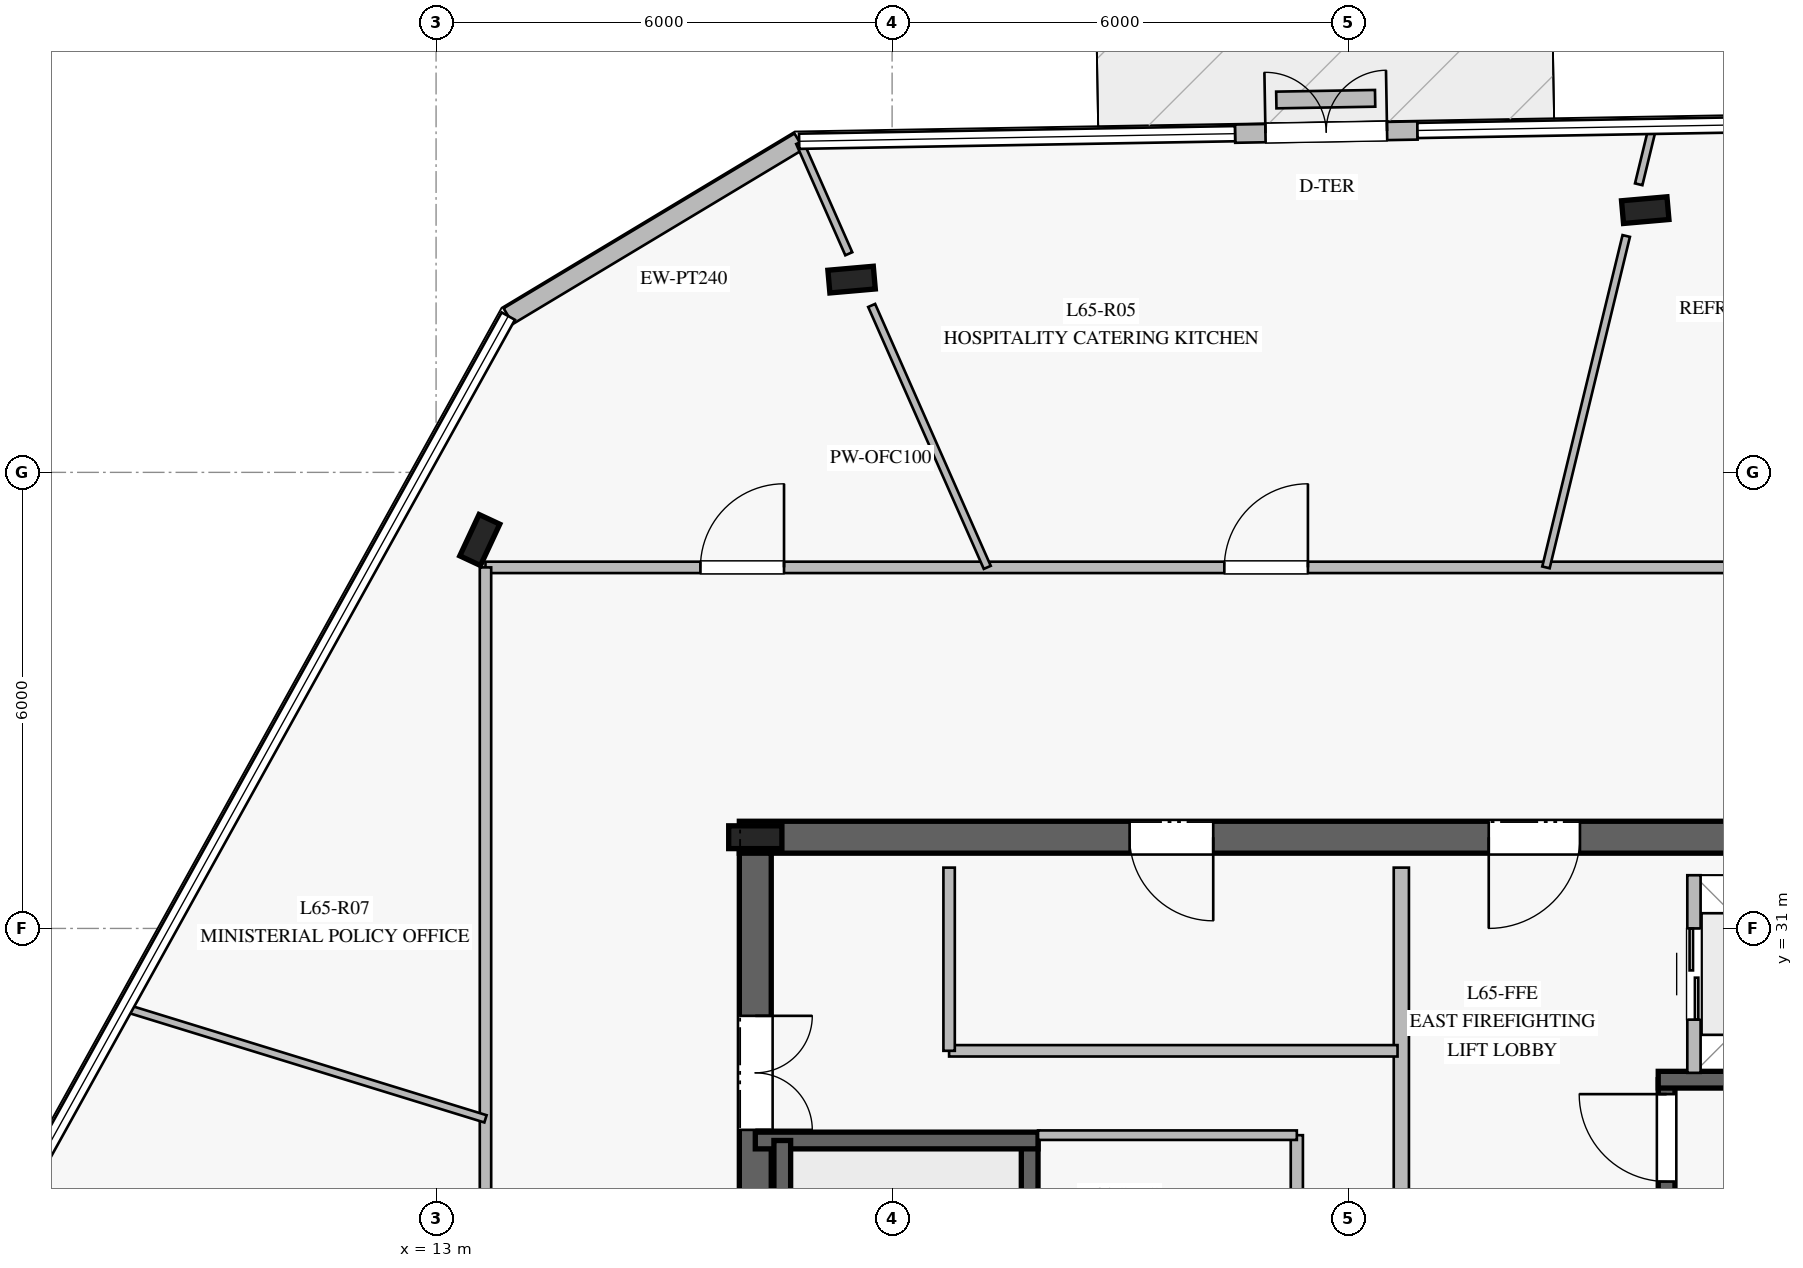
"""IFC4 building model, lengths in metres.
Left out: names, types, materials, properties, quantities, classifications, styles, units other than length and angle.
Written with IfcOpenShell. Run it as: python <this file> out.ifc"""

import sys

from ifc_helpers import new_model, si_unit, direction, frame, frame_2d, origin, origin_2d, place, context, subcontext, project, spatial, rectangle, i_section, extrude, element, fill, save


model = new_model("IFC4")
c1 = context("Model", 3, precision=1e-05, world=origin(), true_north=direction((0.0, 1.0)))
c2 = subcontext(c1, "Body", "Model", "MODEL_VIEW")
j1 = project(units=[si_unit("LENGTHUNIT", "METRE"), si_unit("PLANEANGLEUNIT", "RADIAN")], contexts=[c1])
p1 = place(None, origin())
s1 = spatial("IfcSite", under=j1, at=p1, CompositionType="ELEMENT")
p2 = place(p1, origin())
s2 = spatial("IfcBuilding", under=s1, at=p2, CompositionType="ELEMENT")
p3 = place(p2, frame((0.0, 0.0, 270.2)))
s3 = spatial("IfcBuildingStorey", under=s2, at=p3, CompositionType="ELEMENT", Elevation=270.2)
p4 = place(p3, frame((33.01, 32.2, 0.0), z_axis=(0.0, 0.0, 1.0), x_axis=(-1.0, 0.0, 0.0)))
e1 = element("IfcWall", 1, at=p4, inside=s3, PredefinedType="SHEAR", context=c2, shape_type="SweptSolid", body=[
    extrude(rectangle(XDim=16.02, YDim=0.42, at=frame_2d((8.01, 0.0))), origin(), (0.0, 0.0, 1.0), 3.78),
])
p5 = place(p4, frame((4.96, 0.0, 0.0)))
e2 = element("IfcOpeningElement", 2, at=p5, cuts=e1, PredefinedType="OPENING", context=c2, shape_type="SweptSolid", body=[
    extrude(rectangle(XDim=1.2, YDim=2.25, at=frame_2d((0.6, 1.125))), frame((0.0, 0.22, 0.0), z_axis=(0.0, -1.0, 0.0), x_axis=(1.0, 0.0, 0.0)), (0.0, 0.0, 1.0), 0.44),
])
p6 = place(p4, frame((9.785, 0.0, 0.0)))
e3 = element("IfcOpeningElement", 3, at=p6, cuts=e1, PredefinedType="OPENING", context=c2, shape_type="SweptSolid", body=[
    extrude(rectangle(XDim=1.1, YDim=2.2, at=frame_2d((0.55, 1.1))), frame((0.0, 0.22, 0.0), z_axis=(0.0, -1.0, 0.0), x_axis=(1.0, 0.0, 0.0)), (0.0, 0.0, 1.0), 0.44),
])
p7 = place(p3, frame((17.2, 31.99, 0.0), z_axis=(0.0, 0.0, 1.0), x_axis=(0.0, -1.0, 0.0)))
e4 = element("IfcWall", 4, at=p7, inside=s3, PredefinedType="SHEAR", context=c2, shape_type="SweptSolid", body=[
    extrude(rectangle(XDim=13.98, YDim=0.42, at=frame_2d((6.99, 0.0))), origin(), (0.0, 0.0, 1.0), 3.78),
])
p8 = place(p7, frame((2.14, 0.0, 0.0)))
e5 = element("IfcOpeningElement", 5, at=p8, cuts=e4, PredefinedType="OPENING", context=c2, shape_type="SweptSolid", body=[
    extrude(rectangle(XDim=1.5, YDim=2.2, at=frame_2d((0.75, 1.1))), frame((0.0, 0.22, 0.0), z_axis=(0.0, -1.0, 0.0), x_axis=(1.0, 0.0, 0.0)), (0.0, 0.0, 1.0), 0.44),
])
p9 = place(p3, frame((17.2, 32.2, 0.0), z_axis=(0.0, 0.0, 1.0), x_axis=(1.0, 0.0, 0.0)))
e6 = element("IfcColumn", 6, at=p9, inside=s3, PredefinedType="COLUMN", context=c2, shape_type="SweptSolid", body=[
    extrude(i_section(OverallWidth=0.3, OverallDepth=0.7, WebThickness=0.017, FlangeThickness=0.032, at=origin_2d()), origin(), (0.0, 0.0, 1.0), 4.0),
])
p10 = place(p3, frame((20.81, 20.99, 0.0), z_axis=(0.0, 0.0, 1.0), x_axis=(0.0, 1.0, 0.0)))
e7 = element("IfcWall", 7, at=p10, inside=s3, PredefinedType="SOLIDWALL", context=c2, shape_type="SweptSolid", body=[
    extrude(rectangle(XDim=7.22, YDim=0.22, at=frame_2d((3.61, 0.0))), origin(), (0.0, 0.0, 1.0), 3.78),
])
p11 = place(p10, frame((0.18, 0.0, 0.0)))
e8 = element("IfcOpeningElement", 8, at=p11, cuts=e7, PredefinedType="OPENING", context=c2, shape_type="SweptSolid", body=[
    extrude(rectangle(XDim=1.15, YDim=2.2, at=frame_2d((0.575, 1.1))), frame((0.0, 0.12, 0.0), z_axis=(0.0, -1.0, 0.0), x_axis=(1.0, 0.0, 0.0)), (0.0, 0.0, 1.0), 0.24),
])
p12 = place(p3, frame((17.2, 28.21, 0.0), z_axis=(0.0, 0.0, 1.0), x_axis=(1.0, 0.0, 0.0)))
e9 = element("IfcWall", 9, at=p12, inside=s3, PredefinedType="SOLIDWALL", context=c2, shape_type="SweptSolid", body=[
    extrude(rectangle(XDim=3.72, YDim=0.22, at=frame_2d((1.86, 0.0))), origin(), (0.0, 0.0, 1.0), 3.78),
])
p13 = place(p3, frame((17.555, 28.21, 0.0), z_axis=(0.0, 0.0, 1.0), x_axis=(0.0, -1.0, 0.0)))
e10 = element("IfcWall", 10, at=p13, inside=s3, PredefinedType="SOLIDWALL", context=c2, shape_type="SweptSolid", body=[
    extrude(rectangle(XDim=7.22, YDim=0.22, at=frame_2d((3.61, 0.0))), origin(), (0.0, 0.0, 1.0), 3.78),
])
p14 = place(p3, frame((29.19, 21.79, 0.0), z_axis=(0.0, 0.0, 1.0), x_axis=(0.0, 1.0, 0.0)))
e11 = element("IfcWall", 11, at=p14, inside=s3, PredefinedType="SOLIDWALL", context=c2, shape_type="SweptSolid", body=[
    extrude(rectangle(XDim=7.22, YDim=0.22, at=frame_2d((3.61, 0.0))), origin(), (0.0, 0.0, 1.0), 3.78),
])
p15 = place(p14, frame((5.88, 0.0, 0.0)))
e12 = element("IfcOpeningElement", 12, at=p15, cuts=e11, PredefinedType="OPENING", context=c2, shape_type="SweptSolid", body=[
    extrude(rectangle(XDim=1.15, YDim=2.2, at=frame_2d((0.575, 1.1))), frame((0.0, 0.12, 0.0), z_axis=(0.0, -1.0, 0.0), x_axis=(1.0, 0.0, 0.0)), (0.0, 0.0, 1.0), 0.24),
])
p16 = place(p3, frame((29.08, 29.01, 0.0), z_axis=(0.0, 0.0, 1.0), x_axis=(1.0, 0.0, 0.0)))
e13 = element("IfcWall", 13, at=p16, inside=s3, PredefinedType="SOLIDWALL", context=c2, shape_type="SweptSolid", body=[
    extrude(rectangle(XDim=3.72, YDim=0.22, at=frame_2d((1.86, 0.0))), origin(), (0.0, 0.0, 1.0), 3.78),
])
for number, where, z_axis, x_axis in (
    (14, (28.909, 40.45, 0.0), (0.0, 0.0, 1.0), (0.996, 0.087, 0.0)),
    (15, (18.467, 39.536, 0.0), (0.0, 0.0, 1.0), (0.996, 0.087, 0.0)),
    (16, (13.575, 36.11, 0.0), (0.0, 0.0, 1.0), (0.423, 0.906, 0.0)),
):
    element("IfcColumn", number, at=place(p3, frame(where, z_axis=z_axis, x_axis=x_axis)), inside=s3, PredefinedType="COLUMN", context=c2, shape_type="SweptSolid", body=[
        extrude(i_section(OverallWidth=0.3, OverallDepth=0.6, WebThickness=0.015, FlangeThickness=0.03, at=origin_2d()), origin(), (0.0, 0.0, 1.0), 4.0),
    ])
p17 = place(p3, frame((25.912, 41.498, 0.0), z_axis=(0.0, 0.0, 1.0), x_axis=(-0.999846985771, -0.017492999853, 0.0)))
e17 = element("IfcWall", 17, at=p17, inside=s3, PredefinedType="STANDARD", context=c2, shape_type="SweptSolid", body=[
    extrude(rectangle(XDim=2.401, YDim=0.24, at=frame_2d((1.2, 0.0))), origin(), (0.0, 0.0, 1.0), 3.78),
])
p18 = place(p17, frame((0.4, 0.0, 0.0)))
e18 = element("IfcOpeningElement", 18, at=p18, cuts=e17, PredefinedType="OPENING", context=c2, shape_type="SweptSolid", body=[
    extrude(rectangle(XDim=1.6, YDim=2.25, at=frame_2d((0.8, 1.125))), frame((0.0, 0.13, 0.0), z_axis=(0.0, -1.0, 0.0), x_axis=(1.0, 0.0, 0.0)), (0.0, 0.0, 1.0), 0.26),
])
p19 = place(p3, frame((17.777, 41.356, 0.0), z_axis=(0.0, 0.0, 1.0), x_axis=(-0.857121218243, -0.515114761231, 0.0)))
e19 = element("IfcWall", 19, at=p19, inside=s3, PredefinedType="STANDARD", context=c2, shape_type="SweptSolid", body=[
    extrude(rectangle(XDim=4.465, YDim=0.24, at=frame_2d((2.232, 0.0))), origin(), (0.0, 0.0, 1.0), 3.78),
])
p20 = place(p3, frame((25.355, 41.921, 0.0), z_axis=(0.0, 0.0, 1.0), x_axis=(-0.999857201789, -0.01689899496, 0.0)))
e20 = element("IfcWall", 20, at=p20, inside=s3, PredefinedType="USERDEFINED", context=c2, shape_type="SweptSolid", body=[
    extrude(rectangle(XDim=1.3, YDim=0.22, at=frame_2d((0.65, 0.0))), origin(), (0.0, 0.0, 1.0), 0.4),
])
p21 = place(p3, frame((25.7, 26.65, 0.0), z_axis=(0.0, 0.0, 1.0), x_axis=(0.0, 1.0, 0.0)))
e21 = element("IfcWall", 21, at=p21, inside=s3, PredefinedType="PARTITIONING", context=c2, shape_type="SweptSolid", body=[
    extrude(rectangle(XDim=5.15, YDim=0.2, at=frame_2d((2.575, 0.0))), origin(), (0.0, 0.0, 1.0), 3.78),
])
p22 = place(p3, frame((24.325, 23.35, 0.0), z_axis=(0.0, 0.0, 1.0), x_axis=(0.0, 1.0, 0.0)))
e22 = element("IfcWall", 22, at=p22, inside=s3, PredefinedType="PLUMBINGWALL", context=c2, shape_type="SweptSolid", body=[
    extrude(rectangle(XDim=4.93, YDim=0.16, at=frame_2d((2.465, 0.0))), origin(), (0.0, 0.0, 1.0), 3.78),
])
p23 = place(p22, frame((0.8, 0.0, 0.0)))
e23 = element("IfcOpeningElement", 23, at=p23, cuts=e22, PredefinedType="OPENING", context=c2, shape_type="SweptSolid", body=[
    extrude(rectangle(XDim=0.95, YDim=2.1, at=frame_2d((0.475, 1.05))), frame((0.0, 0.09, 0.0), z_axis=(0.0, -1.0, 0.0), x_axis=(1.0, 0.0, 0.0)), (0.0, 0.0, 1.0), 0.18),
])
p24 = place(p22, frame((3.26, 0.0, 0.0)))
e24 = element("IfcOpeningElement", 24, at=p24, cuts=e22, PredefinedType="OPENING", context=c2, shape_type="SweptSolid", body=[
    extrude(rectangle(XDim=0.9, YDim=2.1, at=frame_2d((0.45, 1.05))), frame((0.0, 0.09, 0.0), z_axis=(0.0, -1.0, 0.0), x_axis=(1.0, 0.0, 0.0)), (0.0, 0.0, 1.0), 0.18),
])
p25 = place(p3, frame((20.92, 28.28, 0.0), z_axis=(0.0, 0.0, 1.0), x_axis=(1.0, 0.0, 0.0)))
e25 = element("IfcWall", 25, at=p25, inside=s3, PredefinedType="PARTITIONING", context=c2, shape_type="SweptSolid", body=[
    extrude(rectangle(XDim=3.405, YDim=0.125, at=frame_2d((1.703, 0.0))), origin(), (0.0, 0.0, 1.0), 3.78),
])
p26 = place(p3, frame((19.75, 29.39, 0.0), z_axis=(0.0, 0.0, 1.0), x_axis=(1.0, 0.0, 0.0)))
e26 = element("IfcWall", 26, at=p26, inside=s3, PredefinedType="PARTITIONING", context=c2, shape_type="SweptSolid", body=[
    extrude(rectangle(XDim=5.9, YDim=0.15, at=frame_2d((2.95, 0.0))), origin(), (0.0, 0.0, 1.0), 3.78),
])
p27 = place(p3, frame((19.75, 29.39, 0.0), z_axis=(0.0, 0.0, 1.0), x_axis=(0.0, 1.0, 0.0)))
e27 = element("IfcWall", 27, at=p27, inside=s3, PredefinedType="PARTITIONING", context=c2, shape_type="SweptSolid", body=[
    extrude(rectangle(XDim=2.41, YDim=0.15, at=frame_2d((1.205, 0.0))), origin(), (0.0, 0.0, 1.0), 3.78),
])
p28 = place(p3, frame((29.55, 29.1, 0.0), z_axis=(0.0, 0.0, 1.0), x_axis=(0.0, 1.0, 0.0)))
e28 = element("IfcWall", 28, at=p28, inside=s3, PredefinedType="PARTITIONING", context=c2, shape_type="SweptSolid", body=[
    extrude(rectangle(XDim=2.6, YDim=0.175, at=frame_2d((1.3, 0.0))), origin(), (0.0, 0.0, 1.0), 3.78),
])
p29 = place(p28, frame((0.7, 0.0, 0.0)))
e29 = element("IfcOpeningElement", 29, at=p29, cuts=e28, PredefinedType="OPENING", context=c2, shape_type="SweptSolid", body=[
    extrude(rectangle(XDim=1.2, YDim=2.2, at=frame_2d((0.6, 1.1))), frame((0.0, 0.098, 0.0), z_axis=(0.0, -1.0, 0.0), x_axis=(1.0, 0.0, 0.0)), (0.0, 0.0, 1.0), 0.195),
])
p30 = place(p3, frame((13.65, 35.75, 0.0), z_axis=(0.0, 0.0, 1.0), x_axis=(1.0, 0.0, 0.0)))
e30 = element("IfcWall", 30, at=p30, inside=s3, PredefinedType="PARTITIONING", context=c2, shape_type="SweptSolid", body=[
    extrude(rectangle(XDim=22.7, YDim=0.15, at=frame_2d((11.35, 0.0))), origin(), (0.0, 0.0, 1.0), 3.02),
])
p31 = place(p30, frame((9.721, 0.0, 0.0)))
e31 = element("IfcOpeningElement", 31, at=p31, cuts=e30, PredefinedType="OPENING", context=c2, shape_type="SweptSolid", body=[
    extrude(rectangle(XDim=1.1, YDim=2.2, at=frame_2d((0.55, 1.1))), frame((0.0, 0.085, 0.0), z_axis=(0.0, -1.0, 0.0), x_axis=(1.0, 0.0, 0.0)), (0.0, 0.0, 1.0), 0.17),
])
p32 = place(p30, frame((17.691, 0.0, 0.0)))
e32 = element("IfcOpeningElement", 32, at=p32, cuts=e30, PredefinedType="OPENING", context=c2, shape_type="SweptSolid", body=[
    extrude(rectangle(XDim=1.1, YDim=2.2, at=frame_2d((0.55, 1.1))), frame((0.0, 0.085, 0.0), z_axis=(0.0, -1.0, 0.0), x_axis=(1.0, 0.0, 0.0)), (0.0, 0.0, 1.0), 0.17),
])
p33 = place(p30, frame((2.828, 0.0, 0.0)))
e33 = element("IfcOpeningElement", 33, at=p33, cuts=e30, PredefinedType="OPENING", context=c2, shape_type="SweptSolid", body=[
    extrude(rectangle(XDim=1.1, YDim=2.2, at=frame_2d((0.55, 1.1))), frame((0.0, 0.085, 0.0), z_axis=(0.0, -1.0, 0.0), x_axis=(1.0, 0.0, 0.0)), (0.0, 0.0, 1.0), 0.17),
])
p34 = place(p3, frame((13.65, 14.25, 0.0), z_axis=(0.0, 0.0, 1.0), x_axis=(0.0, 1.0, 0.0)))
e34 = element("IfcWall", 34, at=p34, inside=s3, PredefinedType="PARTITIONING", context=c2, shape_type="SweptSolid", body=[
    extrude(rectangle(XDim=21.5, YDim=0.15, at=frame_2d((10.75, 0.0))), origin(), (0.0, 0.0, 1.0), 3.25),
])
p35 = place(p34, frame((6.765, 0.0, 0.0)))
e35 = element("IfcOpeningElement", 35, at=p35, cuts=e34, PredefinedType="OPENING", context=c2, shape_type="SweptSolid", body=[
    extrude(rectangle(XDim=1.1, YDim=2.2, at=frame_2d((0.55, 1.1))), frame((0.0, 0.085, 0.0), z_axis=(0.0, -1.0, 0.0), x_axis=(1.0, 0.0, 0.0)), (0.0, 0.0, 1.0), 0.17),
])
p36 = place(p3, frame((20.252, 35.75, 0.0), z_axis=(0.0, 0.0, 1.0), x_axis=(-0.403791793735, 0.914850909882, 0.0)))
e36 = element("IfcWall", 36, at=p36, inside=s3, PredefinedType="MOVABLE", context=c2, shape_type="SweptSolid", body=[
    extrude(rectangle(XDim=3.767, YDim=0.1, at=frame_2d((1.883, 0.0))), origin(), (0.0, 0.0, 1.0), 3.42),
])
p37 = place(p3, frame((18.43, 39.876, 0.0), z_axis=(0.0, 0.0, 1.0), x_axis=(-0.403674010348, 0.914902887398, 0.0)))
e37 = element("IfcWall", 37, at=p37, inside=s3, PredefinedType="MOVABLE", context=c2, shape_type="SweptSolid", body=[
    extrude(rectangle(XDim=1.6, YDim=0.1, at=frame_2d((0.8, 0.0))), origin(), (0.0, 0.0, 1.0), 3.78),
])
p38 = place(p3, frame((13.65, 28.495, 0.0), z_axis=(0.0, 0.0, 1.0), x_axis=(-0.955737392595, 0.29422106722, 0.0)))
e38 = element("IfcWall", 38, at=p38, inside=s3, PredefinedType="MOVABLE", context=c2, shape_type="SweptSolid", body=[
    extrude(rectangle(XDim=4.948, YDim=0.1, at=frame_2d((2.474, 0.0))), origin(), (0.0, 0.0, 1.0), 3.28),
])
p39 = place(p3, frame((27.603, 35.75, 0.0), z_axis=(0.0, 0.0, 1.0), x_axis=(0.235371054184, 0.971905585359, 0.0)))
e39 = element("IfcWall", 39, at=p39, inside=s3, PredefinedType="MOVABLE", context=c2, shape_type="SweptSolid", body=[
    extrude(rectangle(XDim=4.486, YDim=0.1, at=frame_2d((2.243, 0.0))), origin(), (0.0, 0.0, 1.0), 3.02),
])
p40 = place(p3, frame((28.823, 40.79, 0.0), z_axis=(0.0, 0.0, 1.0), x_axis=(0.235718383404, 0.971821405262, 0.0)))
e40 = element("IfcWall", 40, at=p40, inside=s3, PredefinedType="MOVABLE", context=c2, shape_type="SweptSolid", body=[
    extrude(rectangle(XDim=0.768, YDim=0.1, at=frame_2d((0.384, 0.0))), origin(), (0.0, 0.0, 1.0), 3.78),
])
p41 = place(p18, frame((1.6, 0.0, 0.0), z_axis=(0.0, 0.0, 1.0), x_axis=(-1.0, 0.0, 0.0)))
e41 = element("IfcDoor", 41, at=p41, inside=s3, OperationType="DOUBLE_DOOR_SINGLE_SWING", PredefinedType="DOOR", context=c2, shape_type="SweptSolid", body=[
    extrude(rectangle(XDim=1.6, YDim=2.25, at=frame_2d((0.8, 1.125))), frame((0.0, 0.025, 0.0), z_axis=(0.0, -1.0, 0.0), x_axis=(1.0, 0.0, 0.0)), (0.0, 0.0, 1.0), 0.05),
])
fill(e18, e41)
p42 = place(p15, origin())
e42 = element("IfcDoor", 42, at=p42, inside=s3, OperationType="SINGLE_SWING_RIGHT", PredefinedType="DOOR", context=c2, shape_type="SweptSolid", body=[
    extrude(rectangle(XDim=1.15, YDim=2.2, at=frame_2d((0.575, 1.1))), frame((0.0, 0.025, 0.0), z_axis=(0.0, -1.0, 0.0), x_axis=(1.0, 0.0, 0.0)), (0.0, 0.0, 1.0), 0.05),
])
fill(e12, e42)
p43 = place(p5, origin())
e43 = element("IfcDoor", 43, at=p43, inside=s3, OperationType="SINGLE_SWING_RIGHT", PredefinedType="DOOR", context=c2, shape_type="SweptSolid", body=[
    extrude(rectangle(XDim=1.2, YDim=2.25, at=frame_2d((0.6, 1.125))), frame((0.0, 0.025, 0.0), z_axis=(0.0, -1.0, 0.0), x_axis=(1.0, 0.0, 0.0)), (0.0, 0.0, 1.0), 0.05),
])
fill(e2, e43)
p44 = place(p8, origin())
e44 = element("IfcDoor", 44, at=p44, inside=s3, OperationType="DOUBLE_DOOR_SINGLE_SWING", PredefinedType="DOOR", context=c2, shape_type="SweptSolid", body=[
    extrude(rectangle(XDim=1.5, YDim=2.2, at=frame_2d((0.75, 1.1))), frame((0.0, 0.025, 0.0), z_axis=(0.0, -1.0, 0.0), x_axis=(1.0, 0.0, 0.0)), (0.0, 0.0, 1.0), 0.05),
])
fill(e5, e44)
p45 = place(p6, origin())
e45 = element("IfcDoor", 45, at=p45, inside=s3, OperationType="SINGLE_SWING_LEFT", PredefinedType="DOOR", context=c2, shape_type="SweptSolid", body=[
    extrude(rectangle(XDim=1.1, YDim=2.2, at=frame_2d((0.55, 1.1))), frame((0.0, 0.025, 0.0), z_axis=(0.0, -1.0, 0.0), x_axis=(1.0, 0.0, 0.0)), (0.0, 0.0, 1.0), 0.05),
])
fill(e3, e45)
p46 = place(p29, origin())
e46 = element("IfcDoor", 46, at=p46, inside=s3, OperationType="DOUBLE_DOOR_SLIDING", PredefinedType="DOOR", context=c2, shape_type="SweptSolid", body=[
    extrude(rectangle(XDim=1.2, YDim=2.2, at=frame_2d((0.6, 1.1))), frame((0.0, 0.025, 0.0), z_axis=(0.0, -1.0, 0.0), x_axis=(1.0, 0.0, 0.0)), (0.0, 0.0, 1.0), 0.05),
])
fill(e29, e46)
p47 = place(p31, origin())
e47 = element("IfcDoor", 47, at=p47, inside=s3, OperationType="SINGLE_SWING_RIGHT", PredefinedType="DOOR", context=c2, shape_type="SweptSolid", body=[
    extrude(rectangle(XDim=1.1, YDim=2.2, at=frame_2d((0.55, 1.1))), frame((0.0, 0.025, 0.0), z_axis=(0.0, -1.0, 0.0), x_axis=(1.0, 0.0, 0.0)), (0.0, 0.0, 1.0), 0.05),
])
fill(e31, e47)
p48 = place(p33, origin())
e48 = element("IfcDoor", 48, at=p48, inside=s3, OperationType="SINGLE_SWING_RIGHT", PredefinedType="DOOR", context=c2, shape_type="SweptSolid", body=[
    extrude(rectangle(XDim=1.1, YDim=2.2, at=frame_2d((0.55, 1.1))), frame((0.0, 0.025, 0.0), z_axis=(0.0, -1.0, 0.0), x_axis=(1.0, 0.0, 0.0)), (0.0, 0.0, 1.0), 0.05),
])
fill(e33, e48)
save(model, sys.argv[1])
